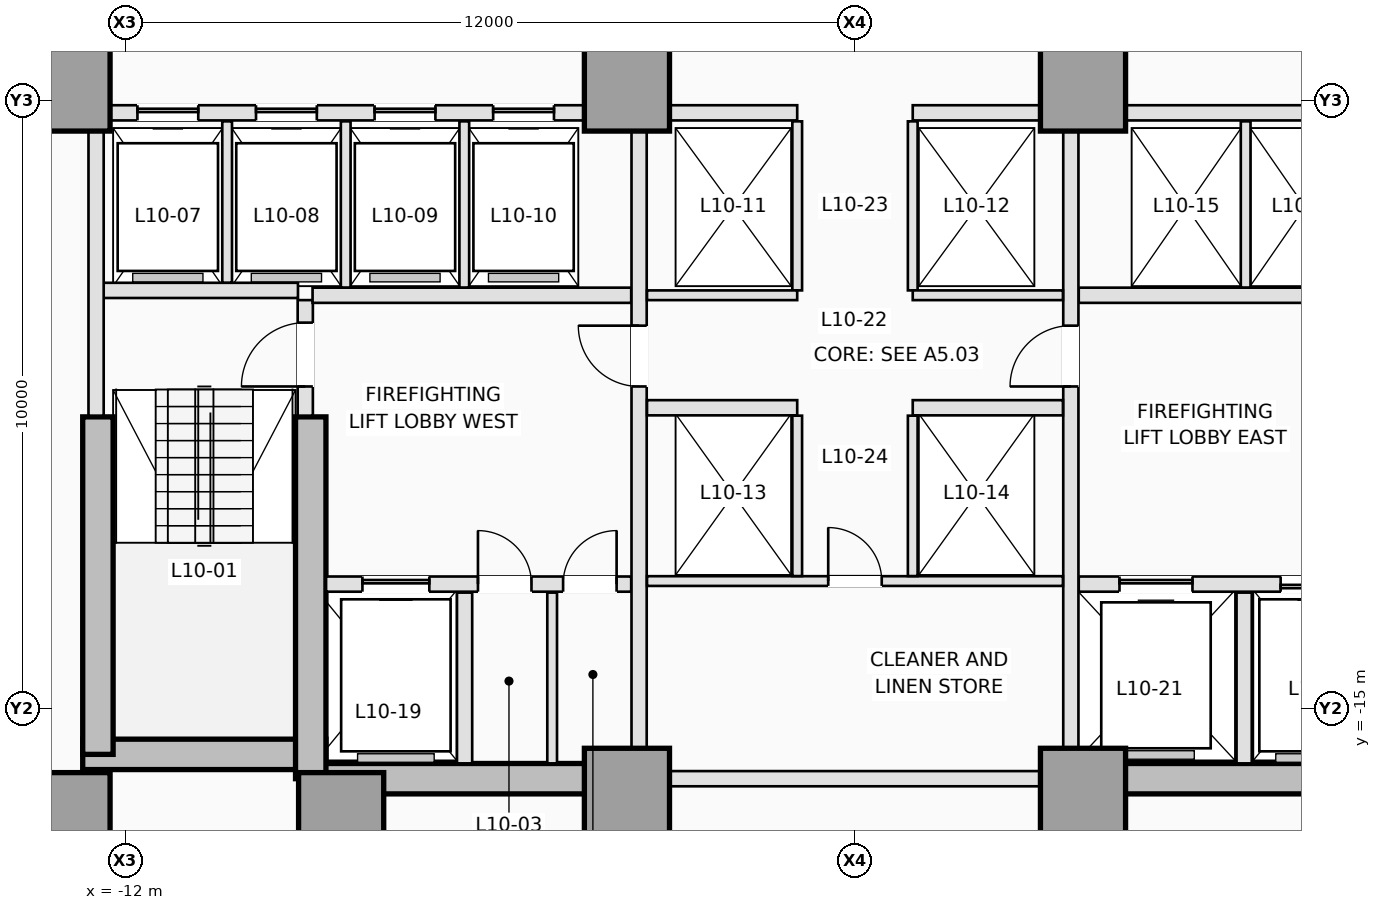
"""IFC4 building model, lengths in metres.
Left out: names, types, materials, properties, quantities, classifications, styles, units other than length and angle.
Written with IfcOpenShell. Run it as: python <this file> out.ifc"""

import sys

from ifc_helpers import new_model, si_unit, direction, frame, frame_2d, origin, origin_2d, place, context, subcontext, project, spatial, rectangle, extrude, element, fill, save


model = new_model("IFC4")
c1 = context("Model", 3, precision=1e-05, world=origin(), true_north=direction((0.0, 1.0)))
c2 = subcontext(c1, "Body", "Model", "MODEL_VIEW")
j1 = project(units=[si_unit("LENGTHUNIT", "METRE"), si_unit("PLANEANGLEUNIT", "RADIAN")], contexts=[c1])
p1 = place(None, origin())
s1 = spatial("IfcSite", under=j1, at=p1, CompositionType="ELEMENT")
p2 = place(p1, origin())
s2 = spatial("IfcBuilding", under=s1, at=p2, CompositionType="ELEMENT")
p3 = place(p2, frame((0.0, 0.0, 41.6)))
s3 = spatial("IfcBuildingStorey", under=s2, at=p3, CompositionType="ELEMENT", Elevation=41.6)
p4 = place(p3, frame((-12.7, -15.75, 0.0), z_axis=(0.0, 0.0, 1.0), x_axis=(1.0, 0.0, 0.0)))
e1 = element("IfcWall", 1, at=p4, inside=s3, PredefinedType="SHEAR", context=c2, shape_type="SweptSolid", body=[
    extrude(rectangle(XDim=4.0, YDim=0.5, at=frame_2d((2.0, 0.0))), origin(), (0.0, 0.0, 1.0), 3.5),
])
for number, where, z_axis, x_axis in (
    (2, (-8.95, -16.15, 0.0), (0.0, 0.0, 1.0), (1.0, 0.0, 0.0)),
    (3, (3.75, -16.15, 0.0), (0.0, 0.0, 1.0), (1.0, 0.0, 0.0)),
):
    element("IfcWall", number, at=place(p3, frame(where, z_axis=z_axis, x_axis=x_axis)), inside=s3, PredefinedType="SHEAR", context=c2, shape_type="SweptSolid", body=[
        extrude(rectangle(XDim=5.2, YDim=0.5, at=frame_2d((2.6, 0.0))), origin(), (0.0, 0.0, 1.0), 3.5),
    ])
p5 = place(p3, frame((-12.45, -15.75, 0.0), z_axis=(0.0, 0.0, 1.0), x_axis=(0.0, 1.0, 0.0)))
e4 = element("IfcWall", 4, at=p5, inside=s3, PredefinedType="SHEAR", context=c2, shape_type="SweptSolid", body=[
    extrude(rectangle(XDim=5.55, YDim=0.5, at=frame_2d((2.775, 0.0))), origin(), (0.0, 0.0, 1.0), 3.5),
])
p6 = place(p3, frame((-8.95, -16.15, 0.0), z_axis=(0.0, 0.0, 1.0), x_axis=(0.0, 1.0, 0.0)))
e5 = element("IfcWall", 5, at=p6, inside=s3, PredefinedType="SHEAR", context=c2, shape_type="SweptSolid", body=[
    extrude(rectangle(XDim=5.95, YDim=0.5, at=frame_2d((2.975, 0.0))), origin(), (0.0, 0.0, 1.0), 3.5),
])
for number, where, z_axis, x_axis in (
    (6, (-12.95, -16.75, 0.0), (0.0, 0.0, 1.0), (1.0, 0.0, 0.0)),
    (7, (-8.45, -16.75, 0.0), (0.0, 0.0, 1.0), (1.0, 0.0, 0.0)),
    (8, (-3.75, -16.35, 0.0), (0.0, 0.0, 1.0), (1.0, 0.0, 0.0)),
    (9, (3.75, -16.35, 0.0), (0.0, 0.0, 1.0), (1.0, 0.0, 0.0)),
    (10, (-12.95, -4.8, 0.0), (0.0, 0.0, 1.0), (1.0, 0.0, 0.0)),
    (11, (-3.75, -4.8, 0.0), (0.0, 0.0, 1.0), (1.0, 0.0, 0.0)),
    (12, (3.75, -4.8, 0.0), (0.0, 0.0, 1.0), (1.0, 0.0, 0.0)),
):
    element("IfcColumn", number, at=place(p3, frame(where, z_axis=z_axis, x_axis=x_axis)), inside=s3, PredefinedType="COLUMN", context=c2, shape_type="SweptSolid", body=[
        extrude(rectangle(XDim=1.4, YDim=1.4, at=origin_2d()), origin(), (0.0, 0.0, 1.0), 3.5),
    ])
p7 = place(p3, frame((-9.04, -10.18, 0.0), z_axis=(0.0, 0.0, 1.0), x_axis=(0.0, 1.0, 0.0)))
e13 = element("IfcWall", 13, at=p7, inside=s3, PredefinedType="PARTITIONING", context=c2, shape_type="SweptSolid", body=[
    extrude(rectangle(XDim=1.9, YDim=0.25, at=frame_2d((0.95, 0.0))), origin(), (0.0, 0.0, 1.0), 3.25),
])
p8 = place(p7, frame((0.48, 0.0, 0.0)))
e14 = element("IfcOpeningElement", 14, at=p8, cuts=e13, PredefinedType="OPENING", context=c2, shape_type="SweptSolid", body=[
    extrude(rectangle(XDim=1.05, YDim=2.15, at=frame_2d((0.525, 1.075))), frame((0.0, 0.135, 0.0), z_axis=(0.0, -1.0, 0.0), x_axis=(1.0, 0.0, 0.0)), (0.0, 0.0, 1.0), 0.27),
])
p9 = place(p3, frame((-12.38, -8.12, 0.0), z_axis=(0.0, 0.0, 1.0), x_axis=(1.0, 0.0, 0.0)))
e15 = element("IfcWall", 15, at=p9, inside=s3, PredefinedType="PARTITIONING", context=c2, shape_type="SweptSolid", body=[
    extrude(rectangle(XDim=3.22, YDim=0.25, at=frame_2d((1.61, 0.0))), origin(), (0.0, 0.0, 1.0), 3.25),
])
p10 = place(p3, frame((-12.48, -10.18, 0.0), z_axis=(0.0, 0.0, 1.0), x_axis=(0.0, 1.0, 0.0)))
e16 = element("IfcWall", 16, at=p10, inside=s3, PredefinedType="PARTITIONING", context=c2, shape_type="SweptSolid", body=[
    extrude(rectangle(XDim=4.678, YDim=0.25, at=frame_2d((2.339, 0.0))), origin(), (0.0, 0.0, 1.0), 3.25),
])
p11 = place(p3, frame((-8.698, -12.95, 0.0), z_axis=(0.0, 0.0, 1.0), x_axis=(1.0, 0.0, 0.0)))
e17 = element("IfcWall", 17, at=p11, inside=s3, PredefinedType="PARTITIONING", context=c2, shape_type="SweptSolid", body=[
    extrude(rectangle(XDim=5.018, YDim=0.25, at=frame_2d((2.509, 0.0))), origin(), (0.0, 0.0, 1.0), 3.25),
])
p12 = place(p11, frame((0.598, 0.0, 0.0)))
e18 = element("IfcOpeningElement", 18, at=p12, cuts=e17, PredefinedType="OPENING", context=c2, shape_type="SweptSolid", body=[
    extrude(rectangle(XDim=1.1, YDim=2.15, at=frame_2d((0.55, 1.075))), frame((0.0, 0.135, 0.0), z_axis=(0.0, -1.0, 0.0), x_axis=(1.0, 0.0, 0.0)), (0.0, 0.0, 1.0), 0.27),
])
p13 = place(p11, frame((2.498, 0.0, 0.0)))
e19 = element("IfcOpeningElement", 19, at=p13, cuts=e17, PredefinedType="OPENING", context=c2, shape_type="SweptSolid", body=[
    extrude(rectangle(XDim=0.88, YDim=2.1, at=frame_2d((0.44, 1.05))), frame((0.0, 0.135, 0.0), z_axis=(0.0, -1.0, 0.0), x_axis=(1.0, 0.0, 0.0)), (0.0, 0.0, 1.0), 0.27),
])
p14 = place(p11, frame((3.898, 0.0, 0.0)))
e20 = element("IfcOpeningElement", 20, at=p14, cuts=e17, PredefinedType="OPENING", context=c2, shape_type="SweptSolid", body=[
    extrude(rectangle(XDim=0.88, YDim=2.1, at=frame_2d((0.44, 1.05))), frame((0.0, 0.135, 0.0), z_axis=(0.0, -1.0, 0.0), x_axis=(1.0, 0.0, 0.0)), (0.0, 0.0, 1.0), 0.27),
])
p15 = place(p3, frame((3.68, -12.95, 0.0), z_axis=(0.0, 0.0, 1.0), x_axis=(1.0, 0.0, 0.0)))
e21 = element("IfcWall", 21, at=p15, inside=s3, PredefinedType="PARTITIONING", context=c2, shape_type="SweptSolid", body=[
    extrude(rectangle(XDim=5.018, YDim=0.25, at=frame_2d((2.509, 0.0))), origin(), (0.0, 0.0, 1.0), 3.25),
])
p16 = place(p15, frame((3.32, 0.0, 0.0)))
e22 = element("IfcOpeningElement", 22, at=p16, cuts=e21, PredefinedType="OPENING", context=c2, shape_type="SweptSolid", body=[
    extrude(rectangle(XDim=1.1, YDim=2.15, at=frame_2d((0.55, 1.075))), frame((0.0, 0.135, 0.0), z_axis=(0.0, -1.0, 0.0), x_axis=(1.0, 0.0, 0.0)), (0.0, 0.0, 1.0), 0.27),
])
p17 = place(p15, frame((0.67, 0.0, 0.0)))
e23 = element("IfcOpeningElement", 23, at=p17, cuts=e21, PredefinedType="OPENING", context=c2, shape_type="SweptSolid", body=[
    extrude(rectangle(XDim=1.2, YDim=2.15, at=frame_2d((0.6, 1.075))), frame((0.0, 0.135, 0.0), z_axis=(0.0, -1.0, 0.0), x_axis=(1.0, 0.0, 0.0)), (0.0, 0.0, 1.0), 0.27),
])
p18 = place(p3, frame((-6.42, -15.898, 0.0), z_axis=(0.0, 0.0, 1.0), x_axis=(0.0, 1.0, 0.0)))
e24 = element("IfcWall", 24, at=p18, inside=s3, PredefinedType="PARTITIONING", context=c2, shape_type="SweptSolid", body=[
    extrude(rectangle(XDim=2.808, YDim=0.25, at=frame_2d((1.404, 0.0))), origin(), (0.0, 0.0, 1.0), 3.25),
])
p19 = place(p3, frame((-4.98, -15.898, 0.0), z_axis=(0.0, 0.0, 1.0), x_axis=(0.0, 1.0, 0.0)))
e25 = element("IfcWall", 25, at=p19, inside=s3, PredefinedType="PARTITIONING", context=c2, shape_type="SweptSolid", body=[
    extrude(rectangle(XDim=2.808, YDim=0.16, at=frame_2d((1.404, 0.0))), origin(), (0.0, 0.0, 1.0), 3.25),
])
p20 = place(p3, frame((6.4, -15.898, 0.0), z_axis=(0.0, 0.0, 1.0), x_axis=(0.0, 1.0, 0.0)))
e26 = element("IfcWall", 26, at=p20, inside=s3, PredefinedType="PARTITIONING", context=c2, shape_type="SweptSolid", body=[
    extrude(rectangle(XDim=2.808, YDim=0.25, at=frame_2d((1.404, 0.0))), origin(), (0.0, 0.0, 1.0), 3.25),
])
for number, where, z_axis, x_axis in (
    (27, (-8.92, -8.2, 0.0), (0.0, 0.0, 1.0), (1.0, 0.0, 0.0)),
    (28, (3.68, -8.2, 0.0), (0.0, 0.0, 1.0), (1.0, 0.0, 0.0)),
):
    element("IfcWall", number, at=place(p3, frame(where, z_axis=z_axis, x_axis=x_axis)), inside=s3, PredefinedType="PARTITIONING", context=c2, shape_type="SweptSolid", body=[
        extrude(rectangle(XDim=5.24, YDim=0.25, at=frame_2d((2.62, 0.0))), origin(), (0.0, 0.0, 1.0), 3.25),
    ])
p21 = place(p3, frame((-3.55, -15.648, 0.0), z_axis=(0.0, 0.0, 1.0), x_axis=(0.0, 1.0, 0.0)))
e29 = element("IfcWall", 29, at=p21, inside=s3, PredefinedType="PARTITIONING", context=c2, shape_type="SweptSolid", body=[
    extrude(rectangle(XDim=10.146, YDim=0.25, at=frame_2d((5.073, 0.0))), origin(), (0.0, 0.0, 1.0), 3.25),
])
p22 = place(p21, frame((5.948, 0.0, 0.0)))
e30 = element("IfcOpeningElement", 30, at=p22, cuts=e29, PredefinedType="OPENING", context=c2, shape_type="SweptSolid", body=[
    extrude(rectangle(XDim=1.0, YDim=2.15, at=frame_2d((0.5, 1.075))), frame((0.0, 0.135, 0.0), z_axis=(0.0, -1.0, 0.0), x_axis=(1.0, 0.0, 0.0)), (0.0, 0.0, 1.0), 0.27),
])
p23 = place(p3, frame((3.55, -15.648, 0.0), z_axis=(0.0, 0.0, 1.0), x_axis=(0.0, 1.0, 0.0)))
e31 = element("IfcWall", 31, at=p23, inside=s3, PredefinedType="PARTITIONING", context=c2, shape_type="SweptSolid", body=[
    extrude(rectangle(XDim=10.146, YDim=0.25, at=frame_2d((5.073, 0.0))), origin(), (0.0, 0.0, 1.0), 3.25),
])
p24 = place(p23, frame((5.948, 0.0, 0.0)))
e32 = element("IfcOpeningElement", 32, at=p24, cuts=e31, PredefinedType="OPENING", context=c2, shape_type="SweptSolid", body=[
    extrude(rectangle(XDim=1.0, YDim=2.15, at=frame_2d((0.5, 1.075))), frame((0.0, 0.135, 0.0), z_axis=(0.0, -1.0, 0.0), x_axis=(1.0, 0.0, 0.0)), (0.0, 0.0, 1.0), 0.27),
])
p25 = place(p3, frame((-12.248, -5.2, 0.0), z_axis=(0.0, 0.0, 1.0), x_axis=(1.0, 0.0, 0.0)))
e33 = element("IfcWall", 33, at=p25, inside=s3, PredefinedType="PARTITIONING", context=c2, shape_type="SweptSolid", body=[
    extrude(rectangle(XDim=7.796, YDim=0.25, at=frame_2d((3.898, 0.0))), origin(), (0.0, 0.0, 1.0), 3.25),
])
p26 = place(p25, frame((0.448, 0.0, 0.0)))
e34 = element("IfcOpeningElement", 34, at=p26, cuts=e33, PredefinedType="OPENING", context=c2, shape_type="SweptSolid", body=[
    extrude(rectangle(XDim=1.0, YDim=2.15, at=frame_2d((0.5, 1.075))), frame((0.0, 0.135, 0.0), z_axis=(0.0, -1.0, 0.0), x_axis=(1.0, 0.0, 0.0)), (0.0, 0.0, 1.0), 0.27),
])
p27 = place(p25, frame((2.398, 0.0, 0.0)))
e35 = element("IfcOpeningElement", 35, at=p27, cuts=e33, PredefinedType="OPENING", context=c2, shape_type="SweptSolid", body=[
    extrude(rectangle(XDim=1.0, YDim=2.15, at=frame_2d((0.5, 1.075))), frame((0.0, 0.135, 0.0), z_axis=(0.0, -1.0, 0.0), x_axis=(1.0, 0.0, 0.0)), (0.0, 0.0, 1.0), 0.27),
])
p28 = place(p25, frame((4.348, 0.0, 0.0)))
e36 = element("IfcOpeningElement", 36, at=p28, cuts=e33, PredefinedType="OPENING", context=c2, shape_type="SweptSolid", body=[
    extrude(rectangle(XDim=1.0, YDim=2.15, at=frame_2d((0.5, 1.075))), frame((0.0, 0.135, 0.0), z_axis=(0.0, -1.0, 0.0), x_axis=(1.0, 0.0, 0.0)), (0.0, 0.0, 1.0), 0.27),
])
p29 = place(p25, frame((6.298, 0.0, 0.0)))
e37 = element("IfcOpeningElement", 37, at=p29, cuts=e33, PredefinedType="OPENING", context=c2, shape_type="SweptSolid", body=[
    extrude(rectangle(XDim=1.0, YDim=2.15, at=frame_2d((0.5, 1.075))), frame((0.0, 0.135, 0.0), z_axis=(0.0, -1.0, 0.0), x_axis=(1.0, 0.0, 0.0)), (0.0, 0.0, 1.0), 0.27),
])
p30 = place(p3, frame((4.452, -5.2, 0.0), z_axis=(0.0, 0.0, 1.0), x_axis=(1.0, 0.0, 0.0)))
e38 = element("IfcWall", 38, at=p30, inside=s3, PredefinedType="PARTITIONING", context=c2, shape_type="SweptSolid", body=[
    extrude(rectangle(XDim=7.796, YDim=0.25, at=frame_2d((3.898, 0.0))), origin(), (0.0, 0.0, 1.0), 3.25),
])
for number, where, z_axis, x_axis in (
    (39, (-3.048, -5.2, 0.0), (0.0, 0.0, 1.0), (1.0, 0.0, 0.0)),
    (40, (0.95, -5.2, 0.0), (0.0, 0.0, 1.0), (1.0, 0.0, 0.0)),
):
    element("IfcWall", number, at=place(p3, frame(where, z_axis=z_axis, x_axis=x_axis)), inside=s3, PredefinedType="PARTITIONING", context=c2, shape_type="SweptSolid", body=[
        extrude(rectangle(XDim=2.098, YDim=0.25, at=frame_2d((1.049, 0.0))), origin(), (0.0, 0.0, 1.0), 3.25),
    ])
p31 = place(p3, frame((-10.325, -7.993, 0.0), z_axis=(0.0, 0.0, 1.0), x_axis=(0.0, 1.0, 0.0)))
e41 = element("IfcWall", 41, at=p31, inside=s3, PredefinedType="PARTITIONING", context=c2, shape_type="SweptSolid", body=[
    extrude(rectangle(XDim=2.653, YDim=0.16, at=frame_2d((1.326, 0.0))), origin(), (0.0, 0.0, 1.0), 3.25),
])
for number, where, z_axis, x_axis in (
    (42, (-8.375, -8.073, 0.0), (0.0, 0.0, 1.0), (0.0, 1.0, 0.0)),
    (43, (-6.425, -8.073, 0.0), (0.0, 0.0, 1.0), (0.0, 1.0, 0.0)),
    (44, (6.425, -8.073, 0.0), (0.0, 0.0, 1.0), (0.0, 1.0, 0.0)),
):
    element("IfcWall", number, at=place(p3, frame(where, z_axis=z_axis, x_axis=x_axis)), inside=s3, PredefinedType="PARTITIONING", context=c2, shape_type="SweptSolid", body=[
        extrude(rectangle(XDim=2.733, YDim=0.16, at=frame_2d((1.366, 0.0))), origin(), (0.0, 0.0, 1.0), 3.25),
    ])
p32 = place(p3, frame((-3.048, -16.15, 0.0), z_axis=(0.0, 0.0, 1.0), x_axis=(1.0, 0.0, 0.0)))
e45 = element("IfcWall", 45, at=p32, inside=s3, PredefinedType="PARTITIONING", context=c2, shape_type="SweptSolid", body=[
    extrude(rectangle(XDim=6.096, YDim=0.25, at=frame_2d((3.048, 0.0))), origin(), (0.0, 0.0, 1.0), 2.3),
])
for number, where, z_axis, x_axis in (
    (46, (-0.95, -8.12, 0.0), (0.0, 0.0, 1.0), (0.0, 1.0, 0.0)),
    (47, (0.95, -8.12, 0.0), (0.0, 0.0, 1.0), (0.0, 1.0, 0.0)),
):
    element("IfcWall", number, at=place(p3, frame(where, z_axis=z_axis, x_axis=x_axis)), inside=s3, PredefinedType="PARTITIONING", context=c2, shape_type="SweptSolid", body=[
        extrude(rectangle(XDim=2.78, YDim=0.16, at=frame_2d((1.39, 0.0))), origin(), (0.0, 0.0, 1.0), 3.25),
    ])
for number, where, z_axis, x_axis in (
    (48, (-3.42, -8.2, 0.0), (0.0, 0.0, 1.0), (1.0, 0.0, 0.0)),
    (49, (0.95, -8.2, 0.0), (0.0, 0.0, 1.0), (1.0, 0.0, 0.0)),
):
    element("IfcWall", number, at=place(p3, frame(where, z_axis=z_axis, x_axis=x_axis)), inside=s3, PredefinedType="PARTITIONING", context=c2, shape_type="SweptSolid", body=[
        extrude(rectangle(XDim=2.47, YDim=0.16, at=frame_2d((1.235, 0.0))), origin(), (0.0, 0.0, 1.0), 3.25),
    ])
for number, where, z_axis, x_axis in (
    (50, (-3.42, -10.05, 0.0), (0.0, 0.0, 1.0), (1.0, 0.0, 0.0)),
    (51, (0.95, -10.05, 0.0), (0.0, 0.0, 1.0), (1.0, 0.0, 0.0)),
):
    element("IfcWall", number, at=place(p3, frame(where, z_axis=z_axis, x_axis=x_axis)), inside=s3, PredefinedType="PARTITIONING", context=c2, shape_type="SweptSolid", body=[
        extrude(rectangle(XDim=2.47, YDim=0.25, at=frame_2d((1.235, 0.0))), origin(), (0.0, 0.0, 1.0), 3.25),
    ])
p33 = place(p3, frame((-3.42, -12.9, 0.0), z_axis=(0.0, 0.0, 1.0), x_axis=(1.0, 0.0, 0.0)))
e52 = element("IfcWall", 52, at=p33, inside=s3, PredefinedType="PARTITIONING", context=c2, shape_type="SweptSolid", body=[
    extrude(rectangle(XDim=6.84, YDim=0.16, at=frame_2d((3.42, 0.0))), origin(), (0.0, 0.0, 1.0), 3.25),
])
p34 = place(p33, frame((2.98, 0.0, 0.0)))
e53 = element("IfcOpeningElement", 53, at=p34, cuts=e52, PredefinedType="OPENING", context=c2, shape_type="SweptSolid", body=[
    extrude(rectangle(XDim=0.88, YDim=2.12, at=frame_2d((0.44, 1.06))), frame((0.0, 0.09, 0.0), z_axis=(0.0, -1.0, 0.0), x_axis=(1.0, 0.0, 0.0)), (0.0, 0.0, 1.0), 0.18),
])
for number, where, z_axis, x_axis in (
    (54, (-0.95, -12.818, 0.0), (0.0, 0.0, 1.0), (0.0, 1.0, 0.0)),
    (55, (0.95, -12.818, 0.0), (0.0, 0.0, 1.0), (0.0, 1.0, 0.0)),
):
    element("IfcWall", number, at=place(p3, frame(where, z_axis=z_axis, x_axis=x_axis)), inside=s3, PredefinedType="PARTITIONING", context=c2, shape_type="SweptSolid", body=[
        extrude(rectangle(XDim=2.638, YDim=0.16, at=frame_2d((1.319, 0.0))), origin(), (0.0, 0.0, 1.0), 3.25),
    ])
p35 = place(p26, origin())
e56 = element("IfcDoor", 56, at=p35, inside=s3, OperationType="SLIDING_TO_LEFT", PredefinedType="DOOR", context=c2, shape_type="SweptSolid", body=[
    extrude(rectangle(XDim=1.0, YDim=2.15, at=frame_2d((0.5, 1.075))), frame((0.0, 0.025, 0.0), z_axis=(0.0, -1.0, 0.0), x_axis=(1.0, 0.0, 0.0)), (0.0, 0.0, 1.0), 0.05),
])
fill(e34, e56)
p36 = place(p27, origin())
e57 = element("IfcDoor", 57, at=p36, inside=s3, OperationType="SLIDING_TO_LEFT", PredefinedType="DOOR", context=c2, shape_type="SweptSolid", body=[
    extrude(rectangle(XDim=1.0, YDim=2.15, at=frame_2d((0.5, 1.075))), frame((0.0, 0.025, 0.0), z_axis=(0.0, -1.0, 0.0), x_axis=(1.0, 0.0, 0.0)), (0.0, 0.0, 1.0), 0.05),
])
fill(e35, e57)
p37 = place(p28, origin())
e58 = element("IfcDoor", 58, at=p37, inside=s3, OperationType="SLIDING_TO_LEFT", PredefinedType="DOOR", context=c2, shape_type="SweptSolid", body=[
    extrude(rectangle(XDim=1.0, YDim=2.15, at=frame_2d((0.5, 1.075))), frame((0.0, 0.025, 0.0), z_axis=(0.0, -1.0, 0.0), x_axis=(1.0, 0.0, 0.0)), (0.0, 0.0, 1.0), 0.05),
])
fill(e36, e58)
p38 = place(p29, origin())
e59 = element("IfcDoor", 59, at=p38, inside=s3, OperationType="SLIDING_TO_LEFT", PredefinedType="DOOR", context=c2, shape_type="SweptSolid", body=[
    extrude(rectangle(XDim=1.0, YDim=2.15, at=frame_2d((0.5, 1.075))), frame((0.0, 0.025, 0.0), z_axis=(0.0, -1.0, 0.0), x_axis=(1.0, 0.0, 0.0)), (0.0, 0.0, 1.0), 0.05),
])
fill(e37, e59)
p39 = place(p12, origin())
e60 = element("IfcDoor", 60, at=p39, inside=s3, OperationType="SLIDING_TO_LEFT", PredefinedType="DOOR", context=c2, shape_type="SweptSolid", body=[
    extrude(rectangle(XDim=1.1, YDim=2.15, at=frame_2d((0.55, 1.075))), frame((0.0, 0.025, 0.0), z_axis=(0.0, -1.0, 0.0), x_axis=(1.0, 0.0, 0.0)), (0.0, 0.0, 1.0), 0.05),
])
fill(e18, e60)
p40 = place(p16, origin())
e61 = element("IfcDoor", 61, at=p40, inside=s3, OperationType="SLIDING_TO_RIGHT", PredefinedType="DOOR", context=c2, shape_type="SweptSolid", body=[
    extrude(rectangle(XDim=1.1, YDim=2.15, at=frame_2d((0.55, 1.075))), frame((0.0, 0.025, 0.0), z_axis=(0.0, -1.0, 0.0), x_axis=(1.0, 0.0, 0.0)), (0.0, 0.0, 1.0), 0.05),
])
fill(e22, e61)
p41 = place(p17, origin())
e62 = element("IfcDoor", 62, at=p41, inside=s3, OperationType="SLIDING_TO_LEFT", PredefinedType="DOOR", context=c2, shape_type="SweptSolid", body=[
    extrude(rectangle(XDim=1.2, YDim=2.15, at=frame_2d((0.6, 1.075))), frame((0.0, 0.025, 0.0), z_axis=(0.0, -1.0, 0.0), x_axis=(1.0, 0.0, 0.0)), (0.0, 0.0, 1.0), 0.05),
])
fill(e23, e62)
p42 = place(p8, origin())
e63 = element("IfcDoor", 63, at=p42, inside=s3, OperationType="SINGLE_SWING_LEFT", PredefinedType="DOOR", context=c2, shape_type="SweptSolid", body=[
    extrude(rectangle(XDim=1.05, YDim=2.15, at=frame_2d((0.525, 1.075))), frame((0.0, 0.025, 0.0), z_axis=(0.0, -1.0, 0.0), x_axis=(1.0, 0.0, 0.0)), (0.0, 0.0, 1.0), 0.05),
])
fill(e14, e63)
p43 = place(p13, origin())
e64 = element("IfcDoor", 64, at=p43, inside=s3, OperationType="SINGLE_SWING_LEFT", PredefinedType="TRAPDOOR", context=c2, shape_type="SweptSolid", body=[
    extrude(rectangle(XDim=0.88, YDim=2.1, at=frame_2d((0.44, 1.05))), frame((0.0, 0.025, 0.0), z_axis=(0.0, -1.0, 0.0), x_axis=(1.0, 0.0, 0.0)), (0.0, 0.0, 1.0), 0.05),
])
fill(e19, e64)
p44 = place(p14, origin())
e65 = element("IfcDoor", 65, at=p44, inside=s3, OperationType="SINGLE_SWING_RIGHT", PredefinedType="TRAPDOOR", context=c2, shape_type="SweptSolid", body=[
    extrude(rectangle(XDim=0.88, YDim=2.1, at=frame_2d((0.44, 1.05))), frame((0.0, 0.025, 0.0), z_axis=(0.0, -1.0, 0.0), x_axis=(1.0, 0.0, 0.0)), (0.0, 0.0, 1.0), 0.05),
])
fill(e20, e65)
p45 = place(p22, origin())
e66 = element("IfcDoor", 66, at=p45, inside=s3, OperationType="SINGLE_SWING_RIGHT", PredefinedType="DOOR", context=c2, shape_type="SweptSolid", body=[
    extrude(rectangle(XDim=1.0, YDim=2.15, at=frame_2d((0.5, 1.075))), frame((0.0, 0.025, 0.0), z_axis=(0.0, -1.0, 0.0), x_axis=(1.0, 0.0, 0.0)), (0.0, 0.0, 1.0), 0.05),
])
fill(e30, e66)
p46 = place(p24, origin())
e67 = element("IfcDoor", 67, at=p46, inside=s3, OperationType="SINGLE_SWING_LEFT", PredefinedType="DOOR", context=c2, shape_type="SweptSolid", body=[
    extrude(rectangle(XDim=1.0, YDim=2.15, at=frame_2d((0.5, 1.075))), frame((0.0, 0.025, 0.0), z_axis=(0.0, -1.0, 0.0), x_axis=(1.0, 0.0, 0.0)), (0.0, 0.0, 1.0), 0.05),
])
fill(e32, e67)
p47 = place(p34, origin())
e68 = element("IfcDoor", 68, at=p47, inside=s3, OperationType="SINGLE_SWING_LEFT", PredefinedType="DOOR", context=c2, shape_type="SweptSolid", body=[
    extrude(rectangle(XDim=0.88, YDim=2.12, at=frame_2d((0.44, 1.06))), frame((0.0, 0.025, 0.0), z_axis=(0.0, -1.0, 0.0), x_axis=(1.0, 0.0, 0.0)), (0.0, 0.0, 1.0), 0.05),
])
fill(e53, e68)
save(model, sys.argv[1])
